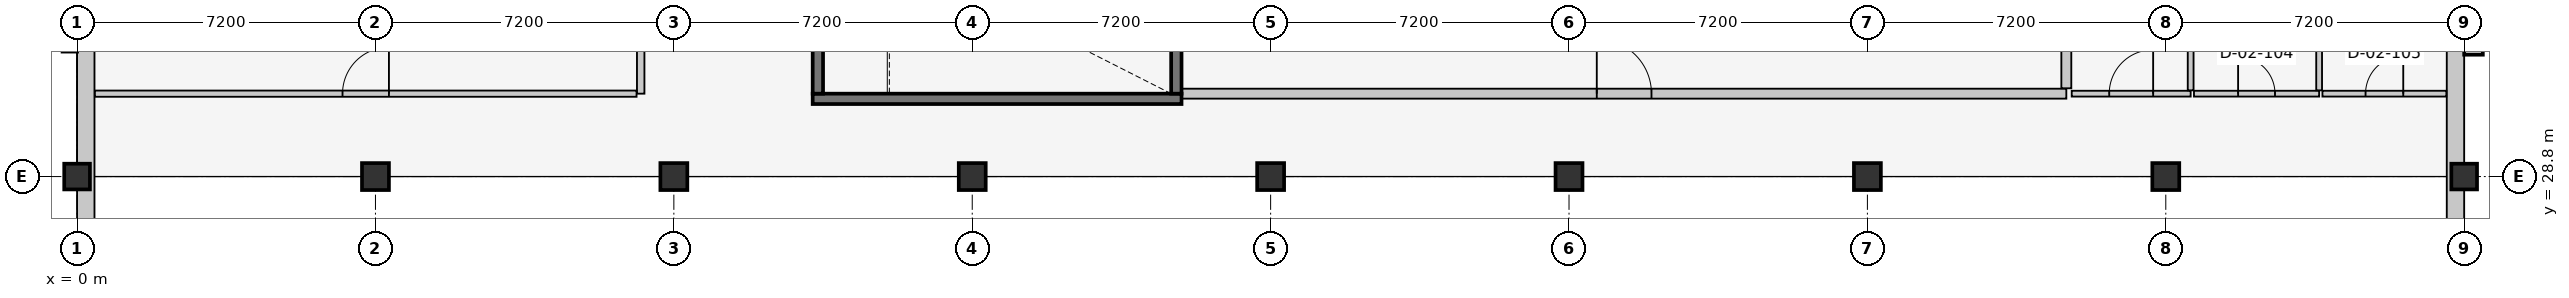
"""IFC4 building model, lengths in metres.
Left out: names, types, materials, properties, quantities, classifications, styles, units other than length and angle.
Written with IfcOpenShell. Run it as: python <this file> out.ifc"""

import sys

from ifc_helpers import new_model, si_unit, direction, frame, frame_2d, origin, origin_2d, place, context, subcontext, project, spatial, rectangle, extrude, element, fill, save


model = new_model("IFC4")
c1 = context("Model", 3, precision=1e-05, world=origin(), true_north=direction((0.0, 1.0)))
c2 = subcontext(c1, "Body", "Model", "MODEL_VIEW")
j1 = project(units=[si_unit("LENGTHUNIT", "METRE"), si_unit("PLANEANGLEUNIT", "RADIAN")], contexts=[c1])
p1 = place(None, origin())
s1 = spatial("IfcSite", under=j1, at=p1, CompositionType="ELEMENT")
p2 = place(p1, origin())
s2 = spatial("IfcBuilding", under=s1, at=p2, CompositionType="ELEMENT")
p3 = place(p2, frame((0.0, 0.0, 9.6)))
s3 = spatial("IfcBuildingStorey", under=s2, at=p3, CompositionType="ELEMENT", Elevation=9.6)
p4 = place(p3, frame((0.0, 28.8, 0.0), z_axis=(0.0, 0.0, 1.0), x_axis=(1.0, 0.0, 0.0)))
e1 = element("IfcColumn", 1, at=p4, inside=s3, PredefinedType="COLUMN", context=c2, shape_type="SweptSolid", body=[
    extrude(rectangle(XDim=0.62, YDim=0.62, at=origin_2d()), origin(), (0.0, 0.0, 1.0), 4.2),
])
for number, where, z_axis, x_axis in (
    (2, (7.2, 28.8, 0.0), (0.0, 0.0, 1.0), (1.0, 0.0, 0.0)),
    (3, (14.4, 28.8, 0.0), (0.0, 0.0, 1.0), (1.0, 0.0, 0.0)),
    (4, (21.6, 28.8, 0.0), (0.0, 0.0, 1.0), (1.0, 0.0, 0.0)),
    (5, (28.8, 28.8, 0.0), (0.0, 0.0, 1.0), (1.0, 0.0, 0.0)),
    (6, (36.0, 28.8, 0.0), (0.0, 0.0, 1.0), (1.0, 0.0, 0.0)),
    (7, (43.2, 28.8, 0.0), (0.0, 0.0, 1.0), (1.0, 0.0, 0.0)),
    (8, (50.4, 28.8, 0.0), (0.0, 0.0, 1.0), (1.0, 0.0, 0.0)),
):
    element("IfcColumn", number, at=place(p3, frame(where, z_axis=z_axis, x_axis=x_axis)), inside=s3, PredefinedType="COLUMN", context=c2, shape_type="SweptSolid", body=[
        extrude(rectangle(XDim=0.65, YDim=0.65, at=origin_2d()), origin(), (0.0, 0.0, 1.0), 4.2),
    ])
p5 = place(p3, frame((57.6, 28.8, 0.0), z_axis=(0.0, 0.0, 1.0), x_axis=(1.0, 0.0, 0.0)))
e9 = element("IfcColumn", 9, at=p5, inside=s3, PredefinedType="COLUMN", context=c2, shape_type="SweptSolid", body=[
    extrude(rectangle(XDim=0.62, YDim=0.62, at=origin_2d()), origin(), (0.0, 0.0, 1.0), 4.2),
])
p6 = place(p3, frame((57.39, 38.4, 0.0), z_axis=(0.0, 0.0, 1.0), x_axis=(0.0, -1.0, 0.0)))
e10 = element("IfcWall", 10, at=p6, inside=s3, PredefinedType="SOLIDWALL", context=c2, shape_type="SweptSolid", body=[
    extrude(rectangle(XDim=38.4, YDim=0.42, at=frame_2d((19.2, 0.0))), origin(), (0.0, 0.0, 1.0), 3.825),
])
p7 = place(p6, frame((1.23, 0.0, 0.9)))
e11 = element("IfcOpeningElement", 11, at=p7, cuts=e10, PredefinedType="OPENING", context=c2, shape_type="SweptSolid", body=[
    extrude(rectangle(XDim=1.38, YDim=1.6, at=frame_2d((0.69, 0.8))), frame((0.0, 0.222, 0.0), z_axis=(0.0, -1.0, 0.0), x_axis=(1.0, 0.0, 0.0)), (0.0, 0.0, 1.0), 0.444),
])
p8 = place(p6, frame((5.01, 0.0, 0.9)))
e12 = element("IfcOpeningElement", 12, at=p8, cuts=e10, PredefinedType="OPENING", context=c2, shape_type="SweptSolid", body=[
    extrude(rectangle(XDim=1.5, YDim=1.6, at=frame_2d((0.75, 0.8))), frame((0.0, 0.222, 0.0), z_axis=(0.0, -1.0, 0.0), x_axis=(1.0, 0.0, 0.0)), (0.0, 0.0, 1.0), 0.444),
])
p9 = place(p3, frame((0.21, 0.0, 0.0), z_axis=(0.0, 0.0, 1.0), x_axis=(0.0, 1.0, 0.0)))
e13 = element("IfcWall", 13, at=p9, inside=s3, PredefinedType="SOLIDWALL", context=c2, shape_type="SweptSolid", body=[
    extrude(rectangle(XDim=38.4, YDim=0.42, at=frame_2d((19.2, 0.0))), origin(), (0.0, 0.0, 1.0), 3.825),
])
p10 = place(p9, frame((31.965, 0.0, 0.9)))
e14 = element("IfcOpeningElement", 14, at=p10, cuts=e13, PredefinedType="OPENING", context=c2, shape_type="SweptSolid", body=[
    extrude(rectangle(XDim=1.35, YDim=1.45, at=frame_2d((0.675, 0.725))), frame((0.0, 0.222, 0.0), z_axis=(0.0, -1.0, 0.0), x_axis=(1.0, 0.0, 0.0)), (0.0, 0.0, 1.0), 0.444),
])
p11 = place(p9, frame((35.755, 0.0, 0.9)))
e15 = element("IfcOpeningElement", 15, at=p11, cuts=e13, PredefinedType="OPENING", context=c2, shape_type="SweptSolid", body=[
    extrude(rectangle(XDim=1.45, YDim=1.45, at=frame_2d((0.725, 0.725))), frame((0.0, 0.222, 0.0), z_axis=(0.0, -1.0, 0.0), x_axis=(1.0, 0.0, 0.0)), (0.0, 0.0, 1.0), 0.444),
])
p12 = place(p3, frame((17.75, 30.675, 0.0), z_axis=(0.0, 0.0, 1.0), x_axis=(1.0, 0.0, 0.0)))
e16 = element("IfcWall", 16, at=p12, inside=s3, PredefinedType="SHEAR", context=c2, shape_type="SweptSolid", body=[
    extrude(rectangle(XDim=8.9, YDim=0.25, at=frame_2d((4.45, 0.0))), origin(), (0.0, 0.0, 1.0), 3.95),
])
p13 = place(p3, frame((17.875, 34.25, 0.0), z_axis=(0.0, 0.0, 1.0), x_axis=(0.0, -1.0, 0.0)))
e17 = element("IfcWall", 17, at=p13, inside=s3, PredefinedType="SHEAR", context=c2, shape_type="SweptSolid", body=[
    extrude(rectangle(XDim=3.45, YDim=0.25, at=frame_2d((1.725, 0.0))), origin(), (0.0, 0.0, 1.0), 3.95),
])
p14 = place(p13, frame((1.125, 0.0, 0.0)))
e18 = element("IfcOpeningElement", 18, at=p14, cuts=e17, PredefinedType="OPENING", context=c2, shape_type="SweptSolid", body=[
    extrude(rectangle(XDim=1.2, YDim=2.15, at=frame_2d((0.6, 1.075))), frame((0.0, 0.137, 0.0), z_axis=(0.0, -1.0, 0.0), x_axis=(1.0, 0.0, 0.0)), (0.0, 0.0, 1.0), 0.274),
])
p15 = place(p3, frame((26.525, 30.8, 0.0), z_axis=(0.0, 0.0, 1.0), x_axis=(0.0, 1.0, 0.0)))
e19 = element("IfcWall", 19, at=p15, inside=s3, PredefinedType="SHEAR", context=c2, shape_type="SweptSolid", body=[
    extrude(rectangle(XDim=3.45, YDim=0.25, at=frame_2d((1.725, 0.0))), origin(), (0.0, 0.0, 1.0), 3.95),
])
p16 = place(p3, frame((13.6, 30.8, 0.0), z_axis=(0.0, 0.0, 1.0), x_axis=(0.0, 1.0, 0.0)))
e20 = element("IfcWall", 20, at=p16, inside=s3, PredefinedType="PARTITIONING", context=c2, shape_type="SweptSolid", body=[
    extrude(rectangle(XDim=7.17, YDim=0.18, at=frame_2d((3.585, 0.0))), origin(), (0.0, 0.0, 1.0), 3.95),
])
p17 = place(p3, frame((0.43, 30.8, 0.0), z_axis=(0.0, 0.0, 1.0), x_axis=(1.0, 0.0, 0.0)))
e21 = element("IfcWall", 21, at=p17, inside=s3, PredefinedType="PARTITIONING", context=c2, shape_type="SweptSolid", body=[
    extrude(rectangle(XDim=13.07, YDim=0.15, at=frame_2d((6.535, 0.0))), origin(), (0.0, 0.0, 1.0), 3.95),
])
p18 = place(p17, frame((5.975, 0.0, 0.0)))
e22 = element("IfcOpeningElement", 22, at=p18, cuts=e21, PredefinedType="OPENING", context=c2, shape_type="SweptSolid", body=[
    extrude(rectangle(XDim=1.12, YDim=2.15, at=frame_2d((0.56, 1.075))), frame((0.0, 0.087, 0.0), z_axis=(0.0, -1.0, 0.0), x_axis=(1.0, 0.0, 0.0)), (0.0, 0.0, 1.0), 0.174),
])
p19 = place(p3, frame((26.66, 30.8, 0.0), z_axis=(0.0, 0.0, 1.0), x_axis=(1.0, 0.0, 0.0)))
e23 = element("IfcWall", 23, at=p19, inside=s3, PredefinedType="PARTITIONING", context=c2, shape_type="SweptSolid", body=[
    extrude(rectangle(XDim=21.34, YDim=0.24, at=frame_2d((10.67, 0.0))), origin(), (0.0, 0.0, 1.0), 3.95),
])
p20 = place(p19, frame((10.01, 0.0, 0.0)))
e24 = element("IfcOpeningElement", 24, at=p20, cuts=e23, PredefinedType="OPENING", context=c2, shape_type="SweptSolid", body=[
    extrude(rectangle(XDim=1.32, YDim=2.15, at=frame_2d((0.66, 1.075))), frame((0.0, 0.132, 0.0), z_axis=(0.0, -1.0, 0.0), x_axis=(1.0, 0.0, 0.0)), (0.0, 0.0, 1.0), 0.264),
])
p21 = place(p3, frame((48.0, 30.93, 0.0), z_axis=(0.0, 0.0, 1.0), x_axis=(0.0, 1.0, 0.0)))
e25 = element("IfcWall", 25, at=p21, inside=s3, PredefinedType="PARTITIONING", context=c2, shape_type="SweptSolid", body=[
    extrude(rectangle(XDim=7.04, YDim=0.24, at=frame_2d((3.52, 0.0))), origin(), (0.0, 0.0, 1.0), 3.775),
])
p22 = place(p3, frame((48.13, 30.8, 0.0), z_axis=(0.0, 0.0, 1.0), x_axis=(1.0, 0.0, 0.0)))
e26 = element("IfcWall", 26, at=p22, inside=s3, PredefinedType="PARTITIONING", context=c2, shape_type="SweptSolid", body=[
    extrude(rectangle(XDim=2.87, YDim=0.14, at=frame_2d((1.435, 0.0))), origin(), (0.0, 0.0, 1.0), 3.95),
])
p23 = place(p22, frame((0.905, 0.0, 0.0)))
e27 = element("IfcOpeningElement", 27, at=p23, cuts=e26, PredefinedType="OPENING", context=c2, shape_type="SweptSolid", body=[
    extrude(rectangle(XDim=1.06, YDim=2.1, at=frame_2d((0.53, 1.05))), frame((0.0, 0.082, 0.0), z_axis=(0.0, -1.0, 0.0), x_axis=(1.0, 0.0, 0.0)), (0.0, 0.0, 1.0), 0.164),
])
p24 = place(p3, frame((51.0, 30.88, 0.0), z_axis=(0.0, 0.0, 1.0), x_axis=(0.0, 1.0, 0.0)))
e28 = element("IfcWall", 28, at=p24, inside=s3, PredefinedType="PARTITIONING", context=c2, shape_type="SweptSolid", body=[
    extrude(rectangle(XDim=7.09, YDim=0.14, at=frame_2d((3.545, 0.0))), origin(), (0.0, 0.0, 1.0), 3.95),
])
p25 = place(p3, frame((51.08, 30.8, 0.0), z_axis=(0.0, 0.0, 1.0), x_axis=(1.0, 0.0, 0.0)))
e29 = element("IfcWall", 29, at=p25, inside=s3, PredefinedType="PARTITIONING", context=c2, shape_type="SweptSolid", body=[
    extrude(rectangle(XDim=3.02, YDim=0.14, at=frame_2d((1.51, 0.0))), origin(), (0.0, 0.0, 1.0), 3.95),
])
p26 = place(p25, frame((1.065, 0.0, 0.0)))
e30 = element("IfcOpeningElement", 30, at=p26, cuts=e29, PredefinedType="OPENING", context=c2, shape_type="SweptSolid", body=[
    extrude(rectangle(XDim=0.89, YDim=2.05, at=frame_2d((0.445, 1.025))), frame((0.0, 0.082, 0.0), z_axis=(0.0, -1.0, 0.0), x_axis=(1.0, 0.0, 0.0)), (0.0, 0.0, 1.0), 0.164),
])
p27 = place(p3, frame((54.1, 30.88, 0.0), z_axis=(0.0, 0.0, 1.0), x_axis=(0.0, 1.0, 0.0)))
e31 = element("IfcWall", 31, at=p27, inside=s3, PredefinedType="PARTITIONING", context=c2, shape_type="SweptSolid", body=[
    extrude(rectangle(XDim=7.09, YDim=0.14, at=frame_2d((3.545, 0.0))), origin(), (0.0, 0.0, 1.0), 3.95),
])
p28 = place(p3, frame((54.18, 30.8, 0.0), z_axis=(0.0, 0.0, 1.0), x_axis=(1.0, 0.0, 0.0)))
e32 = element("IfcWall", 32, at=p28, inside=s3, PredefinedType="PARTITIONING", context=c2, shape_type="SweptSolid", body=[
    extrude(rectangle(XDim=2.99, YDim=0.14, at=frame_2d((1.495, 0.0))), origin(), (0.0, 0.0, 1.0), 3.95),
])
p29 = place(p28, frame((1.04, 0.0, 0.0)))
e33 = element("IfcOpeningElement", 33, at=p29, cuts=e32, PredefinedType="OPENING", context=c2, shape_type="SweptSolid", body=[
    extrude(rectangle(XDim=0.91, YDim=2.06, at=frame_2d((0.455, 1.03))), frame((0.0, 0.082, 0.0), z_axis=(0.0, -1.0, 0.0), x_axis=(1.0, 0.0, 0.0)), (0.0, 0.0, 1.0), 0.164),
])
p30 = place(p18, origin())
e34 = element("IfcDoor", 34, at=p30, inside=s3, OperationType="SINGLE_SWING_RIGHT", PredefinedType="DOOR", context=c2, shape_type="SweptSolid", body=[
    extrude(rectangle(XDim=1.12, YDim=2.15, at=frame_2d((0.56, 1.075))), frame((0.0, 0.025, 0.0), z_axis=(0.0, -1.0, 0.0), x_axis=(1.0, 0.0, 0.0)), (0.0, 0.0, 1.0), 0.05),
])
fill(e22, e34)
p31 = place(p20, origin())
e35 = element("IfcDoor", 35, at=p31, inside=s3, OperationType="SINGLE_SWING_LEFT", PredefinedType="DOOR", context=c2, shape_type="SweptSolid", body=[
    extrude(rectangle(XDim=1.32, YDim=2.15, at=frame_2d((0.66, 1.075))), frame((0.0, 0.025, 0.0), z_axis=(0.0, -1.0, 0.0), x_axis=(1.0, 0.0, 0.0)), (0.0, 0.0, 1.0), 0.05),
])
fill(e24, e35)
p32 = place(p23, origin())
e36 = element("IfcDoor", 36, at=p32, inside=s3, OperationType="SINGLE_SWING_RIGHT", PredefinedType="DOOR", context=c2, shape_type="SweptSolid", body=[
    extrude(rectangle(XDim=1.06, YDim=2.1, at=frame_2d((0.53, 1.05))), frame((0.0, 0.025, 0.0), z_axis=(0.0, -1.0, 0.0), x_axis=(1.0, 0.0, 0.0)), (0.0, 0.0, 1.0), 0.05),
])
fill(e27, e36)
p33 = place(p26, origin())
e37 = element("IfcDoor", 37, at=p33, inside=s3, OperationType="SINGLE_SWING_LEFT", PredefinedType="DOOR", context=c2, shape_type="SweptSolid", body=[
    extrude(rectangle(XDim=0.89, YDim=2.05, at=frame_2d((0.445, 1.025))), frame((0.0, 0.025, 0.0), z_axis=(0.0, -1.0, 0.0), x_axis=(1.0, 0.0, 0.0)), (0.0, 0.0, 1.0), 0.05),
])
fill(e30, e37)
p34 = place(p29, origin())
e38 = element("IfcDoor", 38, at=p34, inside=s3, OperationType="SINGLE_SWING_RIGHT", PredefinedType="DOOR", context=c2, shape_type="SweptSolid", body=[
    extrude(rectangle(XDim=0.91, YDim=2.06, at=frame_2d((0.455, 1.03))), frame((0.0, 0.025, 0.0), z_axis=(0.0, -1.0, 0.0), x_axis=(1.0, 0.0, 0.0)), (0.0, 0.0, 1.0), 0.05),
])
fill(e33, e38)
save(model, sys.argv[1])
